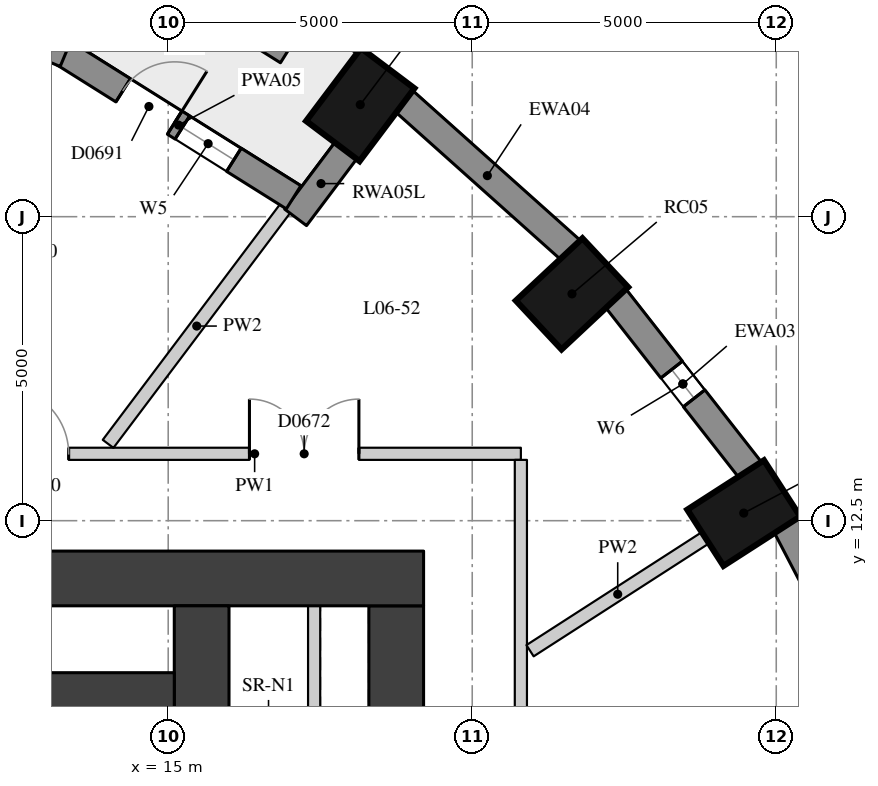
"""IFC4 building model, lengths in metres.
Left out: names, types, materials, properties, quantities, classifications, styles, units other than length and angle.
Written with IfcOpenShell. Run it as: python <this file> out.ifc"""

import sys

from ifc_helpers import new_model, si_unit, direction, frame, frame_2d, origin, origin_2d, place, context, subcontext, project, spatial, rectangle, extrude, element, fill, save


model = new_model("IFC4")
c1 = context("Model", 3, precision=1e-05, world=origin(), true_north=direction((0.0, 1.0)))
c2 = subcontext(c1, "Body", "Model", "MODEL_VIEW")
j1 = project(units=[si_unit("LENGTHUNIT", "METRE"), si_unit("PLANEANGLEUNIT", "RADIAN")], contexts=[c1])
p1 = place(None, origin())
s1 = spatial("IfcSite", under=j1, at=p1, CompositionType="ELEMENT")
p2 = place(p1, origin())
s2 = spatial("IfcBuilding", under=s1, at=p2, CompositionType="ELEMENT")
p3 = place(p2, frame((0.0, 0.0, 28.3)))
s3 = spatial("IfcBuildingStorey", under=s2, at=p3, CompositionType="ELEMENT", Elevation=28.3)
for number, where, z_axis, x_axis in (
    (1, (24.465, 12.625, 0.0), (0.0, 0.0, 1.0), (0.841, 0.541, 0.0)),
    (2, (21.641, 16.23, 0.0), (0.0, 0.0, 1.0), (0.73, 0.683, 0.0)),
    (3, (18.159, 19.343, 0.0), (0.0, 0.0, 1.0), (0.601, 0.799, 0.0)),
):
    element("IfcColumn", number, at=place(p3, frame(where, z_axis=z_axis, x_axis=x_axis)), inside=s3, PredefinedType="COLUMN", context=c2, shape_type="SweptSolid", body=[
        extrude(rectangle(XDim=1.5, YDim=1.1, at=origin_2d()), origin(), (0.0, 0.0, 1.0), 3.3),
    ])
p4 = place(p3, frame((26.786, 9.305, 0.0), z_axis=(0.0, 0.0, 1.0), x_axis=(-0.462492775226, 0.886623050041, 0.0)))
e4 = element("IfcWall", 4, at=p4, inside=s3, PredefinedType="SOLIDWALL", context=c2, shape_type="SweptSolid", body=[
    extrude(rectangle(XDim=3.532, YDim=0.45, at=frame_2d((1.766, 0.0))), origin(), (0.0, 0.0, 1.0), 3.02),
])
p5 = place(p3, frame((24.578, 13.328, 0.0), z_axis=(0.0, 0.0, 1.0), x_axis=(-0.616661975264, 0.787228053529, 0.0)))
e5 = element("IfcWall", 5, at=p5, inside=s3, PredefinedType="SOLIDWALL", context=c2, shape_type="SweptSolid", body=[
    extrude(rectangle(XDim=3.61, YDim=0.45, at=frame_2d((1.805, 0.0))), origin(), (0.0, 0.0, 1.0), 3.02),
])
p6 = place(p5, frame((1.505, 0.0, 0.4)))
e6 = element("IfcOpeningElement", 6, at=p6, cuts=e5, PredefinedType="OPENING", context=c2, shape_type="SweptSolid", body=[
    extrude(rectangle(XDim=0.6, YDim=1.75, at=frame_2d((0.3, 0.875))), frame((0.0, 0.235, 0.0), z_axis=(0.0, -1.0, 0.0), x_axis=(1.0, 0.0, 0.0)), (0.0, 0.0, 1.0), 0.47),
])
p7 = place(p3, frame((21.627, 16.943, 0.0), z_axis=(0.0, 0.0, 1.0), x_axis=(-0.745526233716, 0.66647628228, 0.0)))
e7 = element("IfcWall", 7, at=p7, inside=s3, PredefinedType="SOLIDWALL", context=c2, shape_type="SweptSolid", body=[
    extrude(rectangle(XDim=3.697, YDim=0.45, at=frame_2d((1.848, 0.0))), origin(), (0.0, 0.0, 1.0), 3.02),
])
p8 = place(p3, frame((17.932, 18.6, 0.0), z_axis=(0.0, 0.0, 1.0), x_axis=(-0.601262851241, -0.799051302306, 0.0)))
e8 = element("IfcWall", 8, at=p8, inside=s3, PredefinedType="SOLIDWALL", context=c2, shape_type="SweptSolid", body=[
    extrude(rectangle(XDim=1.391, YDim=0.45, at=frame_2d((0.696, 0.0))), origin(), (0.0, 0.0, 1.0), 3.02),
])
p9 = place(p3, frame((17.062, 17.819, 0.0), z_axis=(0.0, 0.0, 1.0), x_axis=(-0.846990101364, 0.531608660757, 0.0)))
e9 = element("IfcWall", 9, at=p9, inside=s3, PredefinedType="SOLIDWALL", context=c2, shape_type="SweptSolid", body=[
    extrude(rectangle(XDim=4.469, YDim=0.45, at=frame_2d((2.234, 0.0))), origin(), (0.0, 0.0, 1.0), 3.02),
])
p10 = place(p9, frame((1.159, 0.0, 0.4)))
e10 = element("IfcOpeningElement", 10, at=p10, cuts=e9, PredefinedType="OPENING", context=c2, shape_type="SweptSolid", body=[
    extrude(rectangle(XDim=1.0, YDim=1.75, at=frame_2d((0.5, 0.875))), frame((0.0, 0.235, 0.0), z_axis=(0.0, -1.0, 0.0), x_axis=(1.0, 0.0, 0.0)), (0.0, 0.0, 1.0), 0.47),
])
p11 = place(p9, frame((2.31, 0.0, 0.0)))
e11 = element("IfcOpeningElement", 11, at=p11, cuts=e9, PredefinedType="OPENING", context=c2, shape_type="SweptSolid", body=[
    extrude(rectangle(XDim=1.0, YDim=2.15, at=frame_2d((0.5, 1.075))), frame((0.0, 0.235, 0.0), z_axis=(0.0, -1.0, 0.0), x_axis=(1.0, 0.0, 0.0)), (0.0, 0.0, 1.0), 0.47),
])
p12 = place(p3, frame((13.31, 20.178, 0.0), z_axis=(0.0, 0.0, 1.0), x_axis=(-0.922634412489, 0.385675693935, 0.0)))
e12 = element("IfcWall", 12, at=p12, inside=s3, PredefinedType="SOLIDWALL", context=c2, shape_type="SweptSolid", body=[
    extrude(rectangle(XDim=4.577, YDim=0.45, at=frame_2d((2.288, 0.0))), origin(), (0.0, 0.0, 1.0), 3.02),
])
p13 = place(p12, frame((1.213, 0.0, 0.4)))
e13 = element("IfcOpeningElement", 13, at=p13, cuts=e12, PredefinedType="OPENING", context=c2, shape_type="SweptSolid", body=[
    extrude(rectangle(XDim=1.0, YDim=1.75, at=frame_2d((0.5, 0.875))), frame((0.0, 0.235, 0.0), z_axis=(0.0, -1.0, 0.0), x_axis=(1.0, 0.0, 0.0)), (0.0, 0.0, 1.0), 0.47),
])
p14 = place(p12, frame((2.363, 0.0, 0.0)))
e14 = element("IfcOpeningElement", 14, at=p14, cuts=e12, PredefinedType="OPENING", context=c2, shape_type="SweptSolid", body=[
    extrude(rectangle(XDim=1.0, YDim=2.15, at=frame_2d((0.5, 1.075))), frame((0.0, 0.235, 0.0), z_axis=(0.0, -1.0, 0.0), x_axis=(1.0, 0.0, 0.0)), (0.0, 0.0, 1.0), 0.47),
])
p15 = place(p3, frame((17.032, 20.328, 0.0), z_axis=(0.0, 0.0, 1.0), x_axis=(-0.847609446823, 0.530620604252, 0.0)))
e15 = element("IfcWall", 15, at=p15, inside=s3, PredefinedType="USERDEFINED", context=c2, shape_type="SweptSolid", body=[
    extrude(rectangle(XDim=1.8, YDim=0.7, at=frame_2d((0.9, 0.0))), origin(), (0.0, 0.0, 1.0), 0.75),
])
p16 = place(p3, frame((18.75, -11.1, 0.0), z_axis=(0.0, 0.0, 1.0), x_axis=(0.0, 1.0, 0.0)))
e16 = element("IfcWall", 16, at=p16, inside=s3, PredefinedType="SHEAR", context=c2, shape_type="SweptSolid", body=[
    extrude(rectangle(XDim=22.2, YDim=0.9, at=frame_2d((11.1, 0.0))), origin(), (0.0, 0.0, 1.0), 3.02),
])
p17 = place(p16, frame((16.175, 0.0, 0.0)))
e17 = element("IfcOpeningElement", 17, at=p17, cuts=e16, PredefinedType="OPENING", context=c2, shape_type="SweptSolid", body=[
    extrude(rectangle(XDim=1.5, YDim=2.1, at=frame_2d((0.75, 1.05))), frame((0.0, 0.46, 0.0), z_axis=(0.0, -1.0, 0.0), x_axis=(1.0, 0.0, 0.0)), (0.0, 0.0, 1.0), 0.92),
])
p18 = place(p16, frame((5.025, 0.0, 0.0)))
e18 = element("IfcOpeningElement", 18, at=p18, cuts=e16, PredefinedType="OPENING", context=c2, shape_type="SweptSolid", body=[
    extrude(rectangle(XDim=1.5, YDim=2.1, at=frame_2d((0.75, 1.05))), frame((0.0, 0.46, 0.0), z_axis=(0.0, -1.0, 0.0), x_axis=(1.0, 0.0, 0.0)), (0.0, 0.0, 1.0), 0.92),
])
p19 = place(p3, frame((4.0, 11.55, 0.0), z_axis=(0.0, 0.0, 1.0), x_axis=(1.0, 0.0, 0.0)))
e19 = element("IfcWall", 19, at=p19, inside=s3, PredefinedType="SHEAR", context=c2, shape_type="SweptSolid", body=[
    extrude(rectangle(XDim=15.2, YDim=0.9, at=frame_2d((7.6, 0.0))), origin(), (0.0, 0.0, 1.0), 3.02),
])
p20 = place(p3, frame((15.55, -11.1, 0.0), z_axis=(0.0, 0.0, 1.0), x_axis=(0.0, 1.0, 0.0)))
e20 = element("IfcWall", 20, at=p20, inside=s3, PredefinedType="SHEAR", context=c2, shape_type="SweptSolid", body=[
    extrude(rectangle(XDim=22.2, YDim=0.9, at=frame_2d((11.1, 0.0))), origin(), (0.0, 0.0, 1.0), 3.02),
])
p21 = place(p20, frame((15.6, 0.0, 0.0)))
e21 = element("IfcOpeningElement", 21, at=p21, cuts=e20, PredefinedType="OPENING", context=c2, shape_type="SweptSolid", body=[
    extrude(rectangle(XDim=1.0, YDim=2.1, at=frame_2d((0.5, 1.05))), frame((0.0, 0.46, 0.0), z_axis=(0.0, -1.0, 0.0), x_axis=(1.0, 0.0, 0.0)), (0.0, 0.0, 1.0), 0.92),
])
p22 = place(p20, frame((5.6, 0.0, 0.0)))
e22 = element("IfcOpeningElement", 22, at=p22, cuts=e20, PredefinedType="OPENING", context=c2, shape_type="SweptSolid", body=[
    extrude(rectangle(XDim=1.0, YDim=2.1, at=frame_2d((0.5, 1.05))), frame((0.0, 0.46, 0.0), z_axis=(0.0, -1.0, 0.0), x_axis=(1.0, 0.0, 0.0)), (0.0, 0.0, 1.0), 0.92),
])
p23 = place(p3, frame((4.9, 9.55, 0.0), z_axis=(0.0, 0.0, 1.0), x_axis=(1.0, 0.0, 0.0)))
e23 = element("IfcWall", 23, at=p23, inside=s3, PredefinedType="SHEAR", context=c2, shape_type="SweptSolid", body=[
    extrude(rectangle(XDim=10.2, YDim=0.9, at=frame_2d((5.1, 0.0))), origin(), (0.0, 0.0, 1.0), 3.02),
])
p24 = place(p3, frame((17.4, 7.4, 0.0), z_axis=(0.0, 0.0, 1.0), x_axis=(0.0, 1.0, 0.0)))
e24 = element("IfcWall", 24, at=p24, inside=s3, PredefinedType="PARTITIONING", context=c2, shape_type="SweptSolid", body=[
    extrude(rectangle(XDim=3.7, YDim=0.2, at=frame_2d((1.85, 0.0))), origin(), (0.0, 0.0, 1.0), 3.02),
])
p25 = place(p3, frame((12.043, 13.6, 0.0), z_axis=(0.0, 0.0, 1.0), x_axis=(1.0, 0.0, 0.0)))
e25 = element("IfcWall", 25, at=p25, inside=s3, PredefinedType="PARTITIONING", context=c2, shape_type="SweptSolid", body=[
    extrude(rectangle(XDim=8.757, YDim=0.2, at=frame_2d((4.378, 0.0))), origin(), (0.0, 0.0, 1.0), 3.02),
])
p26 = place(p25, frame((0.22, 0.0, 0.0)))
e26 = element("IfcOpeningElement", 26, at=p26, cuts=e25, PredefinedType="OPENING", context=c2, shape_type="SweptSolid", body=[
    extrude(rectangle(XDim=1.1, YDim=2.1, at=frame_2d((0.55, 1.05))), frame((0.0, 0.11, 0.0), z_axis=(0.0, -1.0, 0.0), x_axis=(1.0, 0.0, 0.0)), (0.0, 0.0, 1.0), 0.22),
])
p27 = place(p25, frame((4.293, 0.0, 0.0)))
e27 = element("IfcOpeningElement", 27, at=p27, cuts=e25, PredefinedType="OPENING", context=c2, shape_type="SweptSolid", body=[
    extrude(rectangle(XDim=1.8, YDim=2.1, at=frame_2d((0.9, 1.05))), frame((0.0, 0.11, 0.0), z_axis=(0.0, -1.0, 0.0), x_axis=(1.0, 0.0, 0.0)), (0.0, 0.0, 1.0), 0.22),
])
p28 = place(p3, frame((20.8, 13.5, 0.0), z_axis=(0.0, 0.0, 1.0), x_axis=(0.0, -1.0, 0.0)))
e28 = element("IfcWall", 28, at=p28, inside=s3, PredefinedType="PARTITIONING", context=c2, shape_type="SweptSolid", body=[
    extrude(rectangle(XDim=27.1, YDim=0.2, at=frame_2d((13.55, 0.0))), origin(), (0.0, 0.0, 1.0), 3.02),
])
p29 = place(p28, frame((14.149, 0.0, 0.0)))
e29 = element("IfcOpeningElement", 29, at=p29, cuts=e28, PredefinedType="OPENING", context=c2, shape_type="SweptSolid", body=[
    extrude(rectangle(XDim=1.8, YDim=2.1, at=frame_2d((0.9, 1.05))), frame((0.0, 0.11, 0.0), z_axis=(0.0, -1.0, 0.0), x_axis=(1.0, 0.0, 0.0)), (0.0, 0.0, 1.0), 0.22),
])
p30 = place(p28, frame((5.864, 0.0, 0.0)))
e30 = element("IfcOpeningElement", 30, at=p30, cuts=e28, PredefinedType="OPENING", context=c2, shape_type="SweptSolid", body=[
    extrude(rectangle(XDim=1.8, YDim=2.1, at=frame_2d((0.9, 1.05))), frame((0.0, 0.11, 0.0), z_axis=(0.0, -1.0, 0.0), x_axis=(1.0, 0.0, 0.0)), (0.0, 0.0, 1.0), 0.22),
])
p31 = place(p3, frame((23.835, 12.219, 0.0), z_axis=(0.0, 0.0, 1.0), x_axis=(-0.840694872373, -0.541509124176, 0.0)))
e31 = element("IfcWall", 31, at=p31, inside=s3, PredefinedType="PARTITIONING", context=c2, shape_type="SweptSolid", body=[
    extrude(rectangle(XDim=3.43, YDim=0.22, at=frame_2d((1.715, 0.0))), origin(), (0.0, 0.0, 1.0), 3.02),
])
p32 = place(p3, frame((16.927, 17.638, 0.0), z_axis=(0.0, 0.0, 1.0), x_axis=(-0.601183583641, -0.799110942711, 0.0)))
e32 = element("IfcWall", 32, at=p32, inside=s3, PredefinedType="PARTITIONING", context=c2, shape_type="SweptSolid", body=[
    extrude(rectangle(XDim=4.849, YDim=0.22, at=frame_2d((2.424, 0.0))), origin(), (0.0, 0.0, 1.0), 3.02),
])
p33 = place(p6, origin())
e33 = element("IfcWindow", 33, at=p33, inside=s3, PartitioningType="SINGLE_PANEL", PredefinedType="WINDOW", context=c2, shape_type="SweptSolid", body=[
    extrude(rectangle(XDim=0.6, YDim=1.75, at=frame_2d((0.3, 0.875))), frame((0.0, 0.035, 0.0), z_axis=(0.0, -1.0, 0.0), x_axis=(1.0, 0.0, 0.0)), (0.0, 0.0, 1.0), 0.06),
])
fill(e6, e33)
p34 = place(p10, origin())
e34 = element("IfcWindow", 34, at=p34, inside=s3, PartitioningType="SINGLE_PANEL", PredefinedType="WINDOW", context=c2, shape_type="SweptSolid", body=[
    extrude(rectangle(XDim=1.0, YDim=1.75, at=frame_2d((0.5, 0.875))), frame((0.0, 0.035, 0.0), z_axis=(0.0, -1.0, 0.0), x_axis=(1.0, 0.0, 0.0)), (0.0, 0.0, 1.0), 0.06),
])
fill(e10, e34)
p35 = place(p11, frame((1.0, 0.0, 0.0), z_axis=(0.0, 0.0, 1.0), x_axis=(-1.0, 0.0, 0.0)))
e35 = element("IfcDoor", 35, at=p35, inside=s3, OperationType="SINGLE_SWING_RIGHT", PredefinedType="DOOR", context=c2, shape_type="SweptSolid", body=[
    extrude(rectangle(XDim=1.0, YDim=2.15, at=frame_2d((0.5, 1.075))), frame((0.0, 0.075, 0.0), z_axis=(0.0, -1.0, 0.0), x_axis=(1.0, 0.0, 0.0)), (0.0, 0.0, 1.0), 0.05),
])
fill(e11, e35)
p36 = place(p26, origin())
e36 = element("IfcDoor", 36, at=p36, inside=s3, OperationType="SINGLE_SWING_LEFT", PredefinedType="DOOR", context=c2, shape_type="SweptSolid", body=[
    extrude(rectangle(XDim=1.1, YDim=2.1, at=frame_2d((0.55, 1.05))), frame((0.0, 0.025, 0.0), z_axis=(0.0, -1.0, 0.0), x_axis=(1.0, 0.0, 0.0)), (0.0, 0.0, 1.0), 0.05),
])
fill(e26, e36)
p37 = place(p27, origin())
e37 = element("IfcDoor", 37, at=p37, inside=s3, OperationType="DOUBLE_DOOR_SINGLE_SWING", PredefinedType="DOOR", context=c2, shape_type="SweptSolid", body=[
    extrude(rectangle(XDim=1.8, YDim=2.1, at=frame_2d((0.9, 1.05))), frame((0.0, 0.025, 0.0), z_axis=(0.0, -1.0, 0.0), x_axis=(1.0, 0.0, 0.0)), (0.0, 0.0, 1.0), 0.05),
])
fill(e27, e37)
save(model, sys.argv[1])
